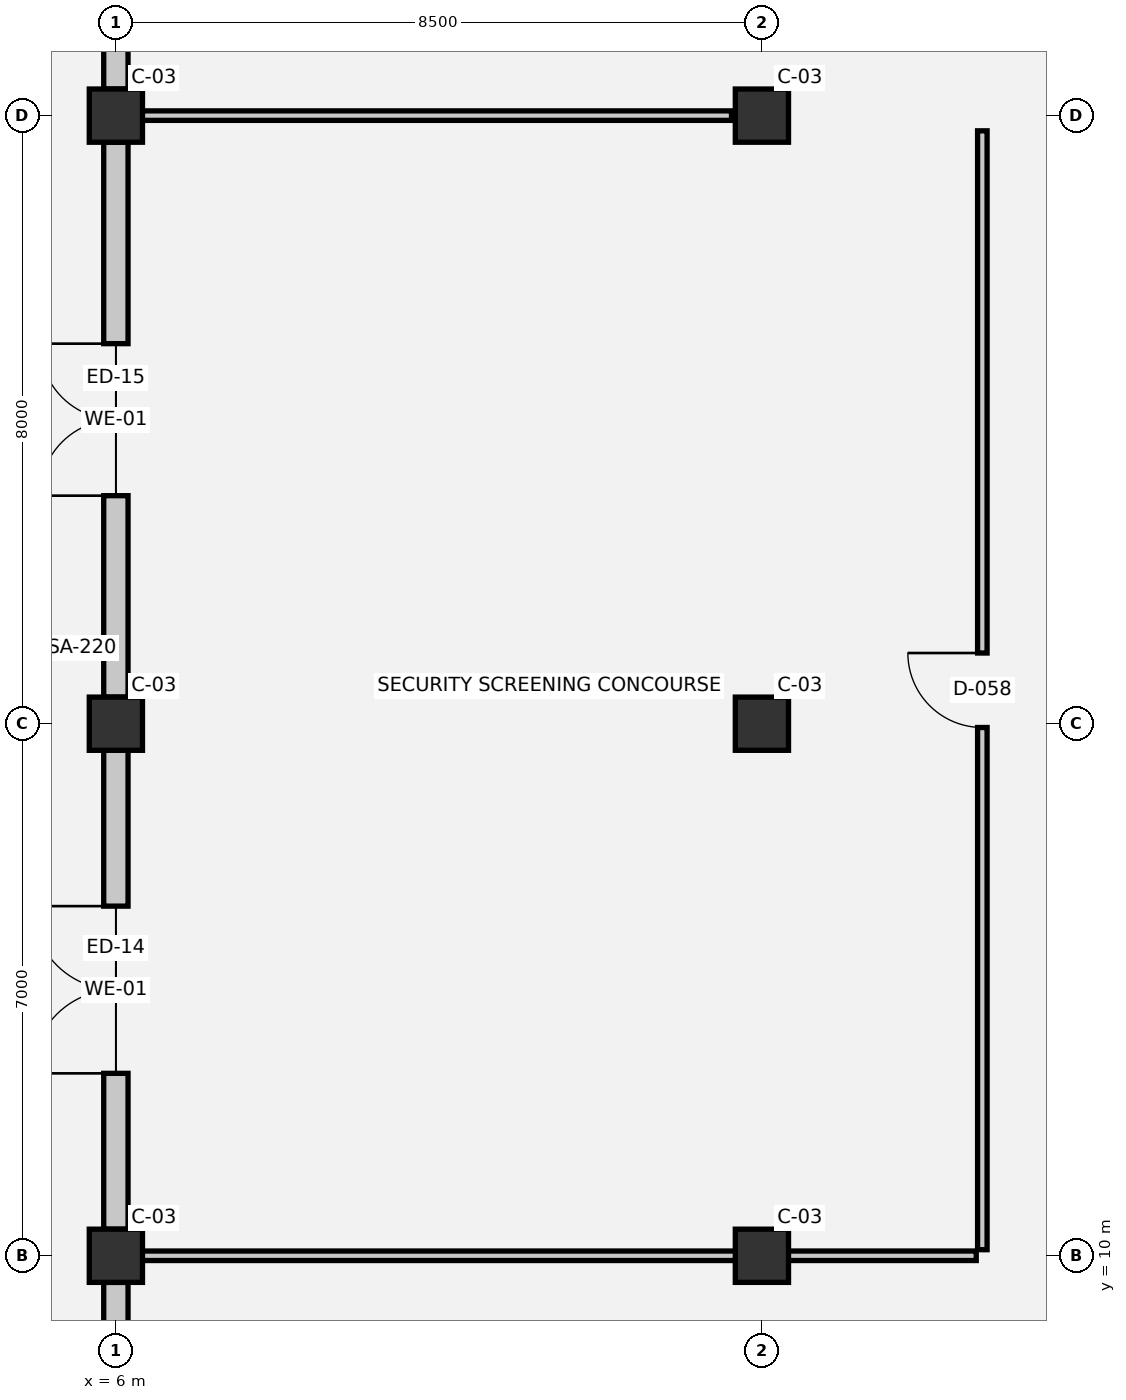
"""IFC4 building model, lengths in metres.
Left out: names, types, materials, properties, quantities, classifications, styles, units other than length and angle.
Written with IfcOpenShell. Run it as: python <this file> out.ifc"""

import sys

from ifc_helpers import new_model, si_unit, direction, frame, frame_2d, origin, origin_2d, place, context, subcontext, project, spatial, rectangle, extrude, element, fill, save


model = new_model("IFC4")
c1 = context("Model", 3, precision=1e-05, world=origin(), true_north=direction((0.0, 1.0)))
c2 = subcontext(c1, "Body", "Model", "MODEL_VIEW")
j1 = project(units=[si_unit("LENGTHUNIT", "METRE"), si_unit("PLANEANGLEUNIT", "RADIAN")], contexts=[c1])
p1 = place(None, origin())
s1 = spatial("IfcSite", under=j1, at=p1, CompositionType="ELEMENT")
p2 = place(p1, origin())
s2 = spatial("IfcBuilding", under=s1, at=p2, CompositionType="ELEMENT")
p3 = place(p2, origin())
s3 = spatial("IfcBuildingStorey", under=s2, at=p3, CompositionType="ELEMENT", Elevation=0.0)
for number, where, z_axis, x_axis in (
    (1, (6.0, 10.0, 0.0), (0.0, 0.0, 1.0), (1.0, 0.0, 0.0)),
    (2, (6.0, 17.0, 0.0), (0.0, 0.0, 1.0), (1.0, 0.0, 0.0)),
    (3, (6.0, 25.0, 0.0), (0.0, 0.0, 1.0), (1.0, 0.0, 0.0)),
    (4, (14.5, 10.0, 0.0), (0.0, 0.0, 1.0), (1.0, 0.0, 0.0)),
    (5, (14.5, 17.0, 0.0), (0.0, 0.0, 1.0), (1.0, 0.0, 0.0)),
    (6, (14.5, 25.0, 0.0), (0.0, 0.0, 1.0), (1.0, 0.0, 0.0)),
):
    element("IfcColumn", number, at=place(p3, frame(where, z_axis=z_axis, x_axis=x_axis)), inside=s3, PredefinedType="COLUMN", context=c2, shape_type="SweptSolid", body=[
        extrude(rectangle(XDim=0.7, YDim=0.7, at=origin_2d()), origin(), (0.0, 0.0, 1.0), 5.4),
    ])
p4 = place(p3, frame((6.0, 4.35, 0.0), z_axis=(0.0, 0.0, 1.0), x_axis=(0.0, 1.0, 0.0)))
e7 = element("IfcWall", 7, at=p4, inside=s3, PredefinedType="SOLIDWALL", context=c2, shape_type="SweptSolid", body=[
    extrude(rectangle(XDim=5.3, YDim=0.32, at=frame_2d((2.65, 0.0))), origin(), (0.0, 0.0, 1.0), 4.16),
])
p5 = place(p4, frame((1.23, 0.0, 0.9)))
e8 = element("IfcOpeningElement", 8, at=p5, cuts=e7, PredefinedType="OPENING", context=c2, shape_type="SweptSolid", body=[
    extrude(rectangle(XDim=2.0, YDim=2.2, at=frame_2d((1.0, 1.1))), frame((0.0, 0.17, 0.0), z_axis=(0.0, -1.0, 0.0), x_axis=(1.0, 0.0, 0.0)), (0.0, 0.0, 1.0), 0.34),
])
p6 = place(p3, frame((6.0, 10.35, 0.0), z_axis=(0.0, 0.0, 1.0), x_axis=(0.0, 1.0, 0.0)))
e9 = element("IfcWall", 9, at=p6, inside=s3, PredefinedType="SOLIDWALL", context=c2, shape_type="SweptSolid", body=[
    extrude(rectangle(XDim=6.3, YDim=0.32, at=frame_2d((3.15, 0.0))), origin(), (0.0, 0.0, 1.0), 4.16),
])
p7 = place(p6, frame((2.05, 0.0, 0.0)))
e10 = element("IfcOpeningElement", 10, at=p7, cuts=e9, PredefinedType="OPENING", context=c2, shape_type="SweptSolid", body=[
    extrude(rectangle(XDim=2.2, YDim=2.4, at=frame_2d((1.1, 1.2))), frame((0.0, 0.17, 0.0), z_axis=(0.0, -1.0, 0.0), x_axis=(1.0, 0.0, 0.0)), (0.0, 0.0, 1.0), 0.34),
])
p8 = place(p3, frame((6.0, 17.35, 0.0), z_axis=(0.0, 0.0, 1.0), x_axis=(0.0, 1.0, 0.0)))
e11 = element("IfcWall", 11, at=p8, inside=s3, PredefinedType="SOLIDWALL", context=c2, shape_type="SweptSolid", body=[
    extrude(rectangle(XDim=7.3, YDim=0.32, at=frame_2d((3.65, 0.0))), origin(), (0.0, 0.0, 1.0), 4.16),
])
p9 = place(p8, frame((2.65, 0.0, 0.0)))
e12 = element("IfcOpeningElement", 12, at=p9, cuts=e11, PredefinedType="OPENING", context=c2, shape_type="SweptSolid", body=[
    extrude(rectangle(XDim=2.0, YDim=2.3, at=frame_2d((1.0, 1.15))), frame((0.0, 0.17, 0.0), z_axis=(0.0, -1.0, 0.0), x_axis=(1.0, 0.0, 0.0)), (0.0, 0.0, 1.0), 0.34),
])
p10 = place(p3, frame((6.0, 25.35, 0.0), z_axis=(0.0, 0.0, 1.0), x_axis=(0.0, 1.0, 0.0)))
e13 = element("IfcWall", 13, at=p10, inside=s3, PredefinedType="SOLIDWALL", context=c2, shape_type="SweptSolid", body=[
    extrude(rectangle(XDim=6.3, YDim=0.32, at=frame_2d((3.15, 0.0))), origin(), (0.0, 0.0, 1.0), 4.16),
])
p11 = place(p3, frame((6.08, 10.0, 0.0), z_axis=(0.0, 0.0, 1.0), x_axis=(1.0, 0.0, 0.0)))
e14 = element("IfcWall", 14, at=p11, inside=s3, PredefinedType="PARTITIONING", context=c2, shape_type="SweptSolid", body=[
    extrude(rectangle(XDim=11.24, YDim=0.125, at=frame_2d((5.62, 0.0))), origin(), (0.0, 0.0, 1.0), 4.43),
])
p12 = place(p3, frame((6.08, 25.0, 0.0), z_axis=(0.0, 0.0, 1.0), x_axis=(1.0, 0.0, 0.0)))
e15 = element("IfcWall", 15, at=p12, inside=s3, PredefinedType="PARTITIONING", context=c2, shape_type="SweptSolid", body=[
    extrude(rectangle(XDim=8.02, YDim=0.125, at=frame_2d((4.01, 0.0))), origin(), (0.0, 0.0, 1.0), 4.43),
])
p13 = place(p3, frame((17.4, 10.08, 0.0), z_axis=(0.0, 0.0, 1.0), x_axis=(0.0, 1.0, 0.0)))
e16 = element("IfcWall", 16, at=p13, inside=s3, PredefinedType="PARTITIONING", context=c2, shape_type="SweptSolid", body=[
    extrude(rectangle(XDim=14.72, YDim=0.125, at=frame_2d((7.36, 0.0))), origin(), (0.0, 0.0, 1.0), 5.04),
])
p14 = place(p13, frame((6.87, 0.0, 0.0)))
e17 = element("IfcOpeningElement", 17, at=p14, cuts=e16, PredefinedType="OPENING", context=c2, shape_type="SweptSolid", body=[
    extrude(rectangle(XDim=0.98, YDim=2.1, at=frame_2d((0.49, 1.05))), frame((0.0, 0.073, 0.0), z_axis=(0.0, -1.0, 0.0), x_axis=(1.0, 0.0, 0.0)), (0.0, 0.0, 1.0), 0.145),
])
p15 = place(p7, origin())
e18 = element("IfcDoor", 18, at=p15, inside=s3, OperationType="DOUBLE_DOOR_SINGLE_SWING", PredefinedType="DOOR", context=c2, shape_type="SweptSolid", body=[
    extrude(rectangle(XDim=2.2, YDim=2.4, at=frame_2d((1.1, 1.2))), frame((0.0, 0.025, 0.0), z_axis=(0.0, -1.0, 0.0), x_axis=(1.0, 0.0, 0.0)), (0.0, 0.0, 1.0), 0.05),
])
fill(e10, e18)
p16 = place(p9, origin())
e19 = element("IfcDoor", 19, at=p16, inside=s3, OperationType="DOUBLE_DOOR_SINGLE_SWING", PredefinedType="DOOR", context=c2, shape_type="SweptSolid", body=[
    extrude(rectangle(XDim=2.0, YDim=2.3, at=frame_2d((1.0, 1.15))), frame((0.0, 0.025, 0.0), z_axis=(0.0, -1.0, 0.0), x_axis=(1.0, 0.0, 0.0)), (0.0, 0.0, 1.0), 0.05),
])
fill(e12, e19)
p17 = place(p14, origin())
e20 = element("IfcDoor", 20, at=p17, inside=s3, OperationType="SINGLE_SWING_RIGHT", PredefinedType="DOOR", context=c2, shape_type="SweptSolid", body=[
    extrude(rectangle(XDim=0.98, YDim=2.1, at=frame_2d((0.49, 1.05))), frame((0.0, 0.025, 0.0), z_axis=(0.0, -1.0, 0.0), x_axis=(1.0, 0.0, 0.0)), (0.0, 0.0, 1.0), 0.05),
])
fill(e17, e20)
save(model, sys.argv[1])
